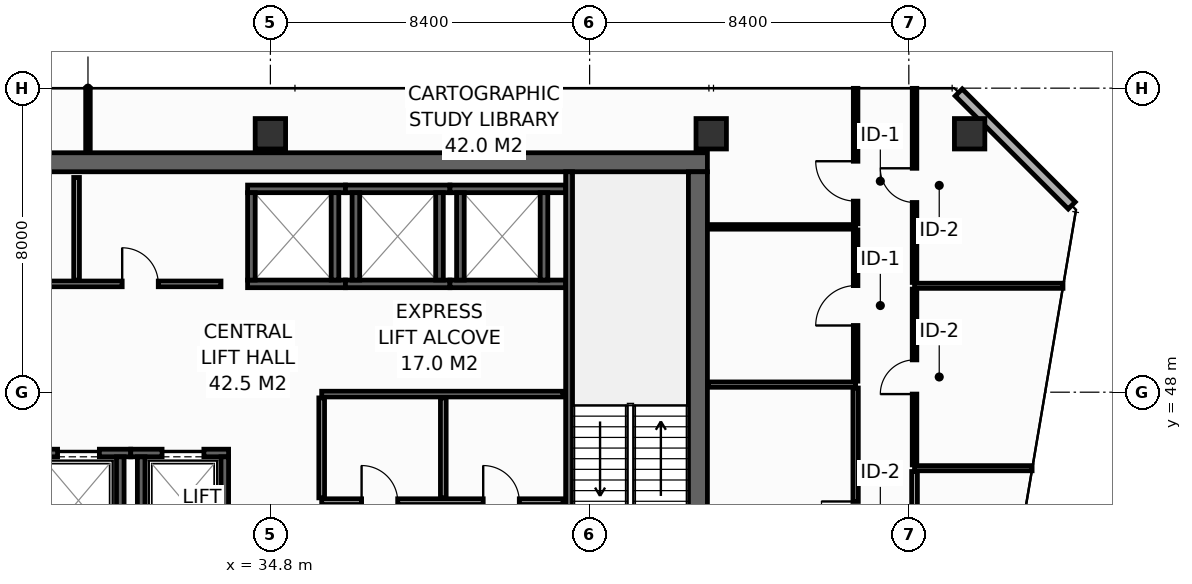
"""IFC4 building model, lengths in metres.
Left out: names, types, materials, properties, quantities, classifications, styles, units other than length and angle.
Written with IfcOpenShell. Run it as: python <this file> out.ifc"""

import sys

from ifc_helpers import new_model, si_unit, direction, frame, frame_2d, origin, origin_2d, place, context, subcontext, project, spatial, rectangle, hollow_rectangle, extrude, element, fill, save


model = new_model("IFC4")
c1 = context("Model", 3, precision=1e-05, world=origin(), true_north=direction((0.0, 1.0)))
c2 = subcontext(c1, "Body", "Model", "MODEL_VIEW")
j1 = project(units=[si_unit("LENGTHUNIT", "METRE"), si_unit("PLANEANGLEUNIT", "RADIAN")], contexts=[c1])
p1 = place(None, origin())
s1 = spatial("IfcSite", under=j1, at=p1, CompositionType="ELEMENT")
p2 = place(p1, origin())
s2 = spatial("IfcBuilding", under=s1, at=p2, CompositionType="ELEMENT")
p3 = place(p2, frame((0.0, 0.0, 194.2)))
s3 = spatial("IfcBuildingStorey", under=s2, at=p3, CompositionType="ELEMENT", Elevation=194.2)
p4 = place(p3, frame((13.6, 54.05, 0.0), z_axis=(0.0, 0.0, 1.0), x_axis=(1.0, 0.0, 0.0)))
e1 = element("IfcWall", 1, at=p4, inside=s3, PredefinedType="SHEAR", context=c2, shape_type="SweptSolid", body=[
    extrude(rectangle(XDim=32.7, YDim=0.5, at=frame_2d((16.35, 0.0))), origin(), (0.0, 0.0, 1.0), 3.55),
])
p5 = place(p3, frame((46.05, 43.4, 0.0), z_axis=(0.0, 0.0, 1.0), x_axis=(0.0, 1.0, 0.0)))
e2 = element("IfcWall", 2, at=p5, inside=s3, PredefinedType="SHEAR", context=c2, shape_type="SweptSolid", body=[
    extrude(rectangle(XDim=10.4, YDim=0.5, at=frame_2d((5.2, 0.0))), origin(), (0.0, 0.0, 1.0), 3.55),
])
for number, where, z_axis, x_axis in (
    (3, (34.8, 54.8, 0.0), (0.0, 0.0, 1.0), (1.0, 0.0, 0.0)),
    (4, (46.4, 54.8, 0.0), (0.0, 0.0, 1.0), (1.0, 0.0, 0.0)),
    (5, (53.2, 54.8, 0.0), (0.0, 0.0, 1.0), (1.0, 0.0, 0.0)),
):
    element("IfcColumn", number, at=place(p3, frame(where, z_axis=z_axis, x_axis=x_axis)), inside=s3, PredefinedType="COLUMN", context=c2, shape_type="SweptSolid", body=[
        extrude(hollow_rectangle(XDim=0.8, YDim=0.8, WallThickness=0.036, at=origin_2d()), origin(), (0.0, 0.0, 1.0), 3.8),
    ])
p6 = place(p3, frame((28.375, 46.4, 0.0), z_axis=(0.0, 0.0, 1.0), x_axis=(1.0, 0.0, 0.0)))
e6 = element("IfcWall", 6, at=p6, inside=s3, PredefinedType="SHEAR", context=c2, shape_type="SweptSolid", body=[
    extrude(rectangle(XDim=2.75, YDim=0.2, at=frame_2d((1.375, 0.0))), origin(), (0.0, 0.0, 1.0), 3.55),
])
p7 = place(p6, frame((0.825, 0.0, 0.0)))
e7 = element("IfcOpeningElement", 7, at=p7, cuts=e6, PredefinedType="OPENING", context=c2, shape_type="SweptSolid", body=[
    extrude(rectangle(XDim=1.1, YDim=2.2, at=frame_2d((0.55, 1.1))), frame((0.0, 0.11, 0.0), z_axis=(0.0, -1.0, 0.0), x_axis=(1.0, 0.0, 0.0)), (0.0, 0.0, 1.0), 0.22),
])
p8 = place(p3, frame((30.85, 44.0, 0.0), z_axis=(0.0, 0.0, 1.0), x_axis=(0.0, 1.0, 0.0)))
e8 = element("IfcWall", 8, at=p8, inside=s3, PredefinedType="SHEAR", context=c2, shape_type="SweptSolid", body=[
    extrude(rectangle(XDim=2.3, YDim=0.2, at=frame_2d((1.15, 0.0))), origin(), (0.0, 0.0, 1.0), 3.55),
])
p9 = place(p3, frame((31.125, 46.4, 0.0), z_axis=(0.0, 0.0, 1.0), x_axis=(1.0, 0.0, 0.0)))
e9 = element("IfcWall", 9, at=p9, inside=s3, PredefinedType="SHEAR", context=c2, shape_type="SweptSolid", body=[
    extrude(rectangle(XDim=2.575, YDim=0.2, at=frame_2d((1.288, 0.0))), origin(), (0.0, 0.0, 1.0), 3.55),
])
p10 = place(p9, frame((0.825, 0.0, 0.0)))
e10 = element("IfcOpeningElement", 10, at=p10, cuts=e9, PredefinedType="OPENING", context=c2, shape_type="SweptSolid", body=[
    extrude(rectangle(XDim=1.1, YDim=2.2, at=frame_2d((0.55, 1.1))), frame((0.0, 0.11, 0.0), z_axis=(0.0, -1.0, 0.0), x_axis=(1.0, 0.0, 0.0)), (0.0, 0.0, 1.0), 0.22),
])
for number, where, z_axis, x_axis in (
    (11, (31.4, 44.0, 0.0), (0.0, 0.0, 1.0), (0.0, 1.0, 0.0)),
    (12, (33.6, 44.0, 0.0), (0.0, 0.0, 1.0), (0.0, 1.0, 0.0)),
):
    element("IfcWall", number, at=place(p3, frame(where, z_axis=z_axis, x_axis=x_axis)), inside=s3, PredefinedType="SHEAR", context=c2, shape_type="SweptSolid", body=[
        extrude(rectangle(XDim=2.3, YDim=0.2, at=frame_2d((1.15, 0.0))), origin(), (0.0, 0.0, 1.0), 3.55),
    ])
for number, where, z_axis, x_axis in (
    (13, (34.2, 50.85, 0.0), (0.0, 0.0, 1.0), (1.0, 0.0, 0.0)),
    (14, (34.2, 53.35, 0.0), (0.0, 0.0, 1.0), (1.0, 0.0, 0.0)),
):
    element("IfcWall", number, at=place(p3, frame(where, z_axis=z_axis, x_axis=x_axis)), inside=s3, PredefinedType="SHEAR", context=c2, shape_type="SweptSolid", body=[
        extrude(rectangle(XDim=2.575, YDim=0.2, at=frame_2d((1.288, 0.0))), origin(), (0.0, 0.0, 1.0), 3.55),
    ])
for number, where, z_axis, x_axis in (
    (15, (34.3, 50.95, 0.0), (0.0, 0.0, 1.0), (0.0, 1.0, 0.0)),
    (16, (36.5, 50.95, 0.0), (0.0, 0.0, 1.0), (0.0, 1.0, 0.0)),
):
    element("IfcWall", number, at=place(p3, frame(where, z_axis=z_axis, x_axis=x_axis)), inside=s3, PredefinedType="SHEAR", context=c2, shape_type="SweptSolid", body=[
        extrude(rectangle(XDim=2.3, YDim=0.2, at=frame_2d((1.15, 0.0))), origin(), (0.0, 0.0, 1.0), 3.55),
    ])
for number, where, z_axis, x_axis in (
    (17, (36.775, 50.85, 0.0), (0.0, 0.0, 1.0), (1.0, 0.0, 0.0)),
    (18, (36.775, 53.35, 0.0), (0.0, 0.0, 1.0), (1.0, 0.0, 0.0)),
):
    element("IfcWall", number, at=place(p3, frame(where, z_axis=z_axis, x_axis=x_axis)), inside=s3, PredefinedType="SHEAR", context=c2, shape_type="SweptSolid", body=[
        extrude(rectangle(XDim=2.75, YDim=0.2, at=frame_2d((1.375, 0.0))), origin(), (0.0, 0.0, 1.0), 3.55),
    ])
for number, where, z_axis, x_axis in (
    (19, (37.05, 50.95, 0.0), (0.0, 0.0, 1.0), (0.0, 1.0, 0.0)),
    (20, (39.25, 50.95, 0.0), (0.0, 0.0, 1.0), (0.0, 1.0, 0.0)),
):
    element("IfcWall", number, at=place(p3, frame(where, z_axis=z_axis, x_axis=x_axis)), inside=s3, PredefinedType="SHEAR", context=c2, shape_type="SweptSolid", body=[
        extrude(rectangle(XDim=2.3, YDim=0.2, at=frame_2d((1.15, 0.0))), origin(), (0.0, 0.0, 1.0), 3.55),
    ])
for number, where, z_axis, x_axis in (
    (21, (39.525, 50.85, 0.0), (0.0, 0.0, 1.0), (1.0, 0.0, 0.0)),
    (22, (39.525, 53.35, 0.0), (0.0, 0.0, 1.0), (1.0, 0.0, 0.0)),
):
    element("IfcWall", number, at=place(p3, frame(where, z_axis=z_axis, x_axis=x_axis)), inside=s3, PredefinedType="SHEAR", context=c2, shape_type="SweptSolid", body=[
        extrude(rectangle(XDim=3.045, YDim=0.2, at=frame_2d((1.522, 0.0))), origin(), (0.0, 0.0, 1.0), 3.55),
    ])
for number, where, z_axis, x_axis in (
    (23, (39.8, 50.95, 0.0), (0.0, 0.0, 1.0), (0.0, 1.0, 0.0)),
    (24, (42.0, 50.95, 0.0), (0.0, 0.0, 1.0), (0.0, 1.0, 0.0)),
):
    element("IfcWall", number, at=place(p3, frame(where, z_axis=z_axis, x_axis=x_axis)), inside=s3, PredefinedType="SHEAR", context=c2, shape_type="SweptSolid", body=[
        extrude(rectangle(XDim=2.3, YDim=0.2, at=frame_2d((1.15, 0.0))), origin(), (0.0, 0.0, 1.0), 3.55),
    ])
p11 = place(p3, frame((42.66, 53.8, 0.0), z_axis=(0.0, 0.0, 1.0), x_axis=(0.0, -1.0, 0.0)))
e25 = element("IfcWall", 25, at=p11, inside=s3, PredefinedType="SHEAR", context=c2, shape_type="SweptSolid", body=[
    extrude(rectangle(XDim=10.4, YDim=0.18, at=frame_2d((5.2, 0.0))), origin(), (0.0, 0.0, 1.0), 3.55),
])
p12 = place(p11, frame((8.99, 0.0, 0.0)))
e26 = element("IfcOpeningElement", 26, at=p12, cuts=e25, PredefinedType="OPENING", context=c2, shape_type="SweptSolid", body=[
    extrude(rectangle(XDim=1.1, YDim=2.15, at=frame_2d((0.55, 1.075))), frame((0.0, 0.1, 0.0), z_axis=(0.0, -1.0, 0.0), x_axis=(1.0, 0.0, 0.0)), (0.0, 0.0, 1.0), 0.2),
])
p13 = place(p3, frame((36.15, 45.12, 0.0), z_axis=(0.0, 0.0, 1.0), x_axis=(1.0, 0.0, 0.0)))
e27 = element("IfcWall", 27, at=p13, inside=s3, PredefinedType="PARTITIONING", context=c2, shape_type="SweptSolid", body=[
    extrude(rectangle(XDim=6.35, YDim=0.15, at=frame_2d((3.175, 0.0))), origin(), (0.0, 0.0, 1.0), 3.55),
])
p14 = place(p13, frame((1.05, 0.0, 0.0)))
e28 = element("IfcOpeningElement", 28, at=p14, cuts=e27, PredefinedType="OPENING", context=c2, shape_type="SweptSolid", body=[
    extrude(rectangle(XDim=0.95, YDim=2.15, at=frame_2d((0.475, 1.075))), frame((0.0, 0.085, 0.0), z_axis=(0.0, -1.0, 0.0), x_axis=(1.0, 0.0, 0.0)), (0.0, 0.0, 1.0), 0.17),
])
p15 = place(p13, frame((4.25, 0.0, 0.0)))
e29 = element("IfcOpeningElement", 29, at=p15, cuts=e27, PredefinedType="OPENING", context=c2, shape_type="SweptSolid", body=[
    extrude(rectangle(XDim=0.95, YDim=2.15, at=frame_2d((0.475, 1.075))), frame((0.0, 0.085, 0.0), z_axis=(0.0, -1.0, 0.0), x_axis=(1.0, 0.0, 0.0)), (0.0, 0.0, 1.0), 0.17),
])
p16 = place(p3, frame((36.15, 47.95, 0.0), z_axis=(0.0, 0.0, 1.0), x_axis=(1.0, 0.0, 0.0)))
e30 = element("IfcWall", 30, at=p16, inside=s3, PredefinedType="PARTITIONING", context=c2, shape_type="SweptSolid", body=[
    extrude(rectangle(XDim=6.35, YDim=0.15, at=frame_2d((3.175, 0.0))), origin(), (0.0, 0.0, 1.0), 3.55),
])
for number, where, z_axis, x_axis in (
    (31, (36.15, 45.22, 0.0), (0.0, 0.0, 1.0), (0.0, 1.0, 0.0)),
    (32, (39.35, 45.22, 0.0), (0.0, 0.0, 1.0), (0.0, 1.0, 0.0)),
):
    element("IfcWall", number, at=place(p3, frame(where, z_axis=z_axis, x_axis=x_axis)), inside=s3, PredefinedType="PARTITIONING", context=c2, shape_type="SweptSolid", body=[
        extrude(rectangle(XDim=2.63, YDim=0.15, at=frame_2d((1.315, 0.0))), origin(), (0.0, 0.0, 1.0), 3.55),
    ])
p17 = place(p3, frame((25.85, 50.85, 0.0), z_axis=(0.0, 0.0, 1.0), x_axis=(1.0, 0.0, 0.0)))
e33 = element("IfcWall", 33, at=p17, inside=s3, PredefinedType="PARTITIONING", context=c2, shape_type="SweptSolid", body=[
    extrude(rectangle(XDim=7.65, YDim=0.15, at=frame_2d((3.825, 0.0))), origin(), (0.0, 0.0, 1.0), 3.55),
])
p18 = place(p17, frame((1.25, 0.0, 0.0)))
e34 = element("IfcOpeningElement", 34, at=p18, cuts=e33, PredefinedType="OPENING", context=c2, shape_type="SweptSolid", body=[
    extrude(rectangle(XDim=0.95, YDim=2.15, at=frame_2d((0.475, 1.075))), frame((0.0, 0.085, 0.0), z_axis=(0.0, -1.0, 0.0), x_axis=(1.0, 0.0, 0.0)), (0.0, 0.0, 1.0), 0.17),
])
p19 = place(p17, frame((5.05, 0.0, 0.0)))
e35 = element("IfcOpeningElement", 35, at=p19, cuts=e33, PredefinedType="OPENING", context=c2, shape_type="SweptSolid", body=[
    extrude(rectangle(XDim=0.95, YDim=2.15, at=frame_2d((0.475, 1.075))), frame((0.0, 0.085, 0.0), z_axis=(0.0, -1.0, 0.0), x_axis=(1.0, 0.0, 0.0)), (0.0, 0.0, 1.0), 0.17),
])
p20 = place(p3, frame((29.7, 50.95, 0.0), z_axis=(0.0, 0.0, 1.0), x_axis=(0.0, 1.0, 0.0)))
e36 = element("IfcWall", 36, at=p20, inside=s3, PredefinedType="PARTITIONING", context=c2, shape_type="SweptSolid", body=[
    extrude(rectangle(XDim=2.7, YDim=0.15, at=frame_2d((1.35, 0.0))), origin(), (0.0, 0.0, 1.0), 3.55),
])
p21 = place(p3, frame((55.887, 52.913, 0.0), z_axis=(0.0, 0.0, 1.0), x_axis=(-0.707106781187, 0.707106781187, 0.0)))
e37 = element("IfcWall", 37, at=p21, inside=s3, PredefinedType="STANDARD", context=c2, shape_type="SweptSolid", body=[
    extrude(rectangle(XDim=4.206, YDim=0.26, at=frame_2d((2.103, 0.0))), origin(), (0.0, 0.0, 1.0), 3.55),
])
p22 = place(p3, frame((46.32, 48.2, 0.0), z_axis=(0.0, 0.0, 1.0), x_axis=(1.0, 0.0, 0.0)))
e38 = element("IfcWall", 38, at=p22, inside=s3, PredefinedType="PARTITIONING", context=c2, shape_type="SweptSolid", body=[
    extrude(rectangle(XDim=3.88, YDim=0.14, at=frame_2d((1.94, 0.0))), origin(), (0.0, 0.0, 1.0), 3.55),
])
p23 = place(p3, frame((50.2, 41.24, 0.0), z_axis=(0.0, 0.0, 1.0), x_axis=(0.0, 1.0, 0.0)))
e39 = element("IfcWall", 39, at=p23, inside=s3, PredefinedType="PARTITIONING", context=c2, shape_type="SweptSolid", body=[
    extrude(rectangle(XDim=6.87, YDim=0.14, at=frame_2d((3.435, 0.0))), origin(), (0.0, 0.0, 1.0), 2.835),
])
p24 = place(p23, frame((2.985, 0.0, 0.0)))
e40 = element("IfcOpeningElement", 40, at=p24, cuts=e39, PredefinedType="OPENING", context=c2, shape_type="SweptSolid", body=[
    extrude(rectangle(XDim=0.9, YDim=2.1, at=frame_2d((0.45, 1.05))), frame((0.0, 0.08, 0.0), z_axis=(0.0, -1.0, 0.0), x_axis=(1.0, 0.0, 0.0)), (0.0, 0.0, 1.0), 0.16),
])
p25 = place(p3, frame((46.32, 52.35, 0.0), z_axis=(0.0, 0.0, 1.0), x_axis=(1.0, 0.0, 0.0)))
e41 = element("IfcWall", 41, at=p25, inside=s3, PredefinedType="PARTITIONING", context=c2, shape_type="SweptSolid", body=[
    extrude(rectangle(XDim=3.88, YDim=0.12, at=frame_2d((1.94, 0.0))), origin(), (0.0, 0.0, 1.0), 3.55),
])
p26 = place(p3, frame((30.0, 54.32, 0.0), z_axis=(0.0, 0.0, 1.0), x_axis=(0.0, 1.0, 0.0)))
e42 = element("IfcWall", 42, at=p26, inside=s3, PredefinedType="PARTITIONING", context=c2, shape_type="SweptSolid", body=[
    extrude(rectangle(XDim=1.675, YDim=0.12, at=frame_2d((0.837, 0.0))), origin(), (0.0, 0.0, 1.0), 2.935),
])
p27 = place(p3, frame((50.2, 48.29, 0.0), z_axis=(0.0, 0.0, 1.0), x_axis=(0.0, 1.0, 0.0)))
e43 = element("IfcWall", 43, at=p27, inside=s3, PredefinedType="PARTITIONING", context=c2, shape_type="SweptSolid", body=[
    extrude(rectangle(XDim=3.98, YDim=0.12, at=frame_2d((1.99, 0.0))), origin(), (0.0, 0.0, 1.0), 3.55),
])
p28 = place(p27, frame((1.465, 0.0, 0.0)))
e44 = element("IfcOpeningElement", 44, at=p28, cuts=e43, PredefinedType="OPENING", context=c2, shape_type="SweptSolid", body=[
    extrude(rectangle(XDim=1.05, YDim=2.15, at=frame_2d((0.525, 1.075))), frame((0.0, 0.07, 0.0), z_axis=(0.0, -1.0, 0.0), x_axis=(1.0, 0.0, 0.0)), (0.0, 0.0, 1.0), 0.14),
])
p29 = place(p3, frame((50.2, 52.43, 0.0), z_axis=(0.0, 0.0, 1.0), x_axis=(0.0, 1.0, 0.0)))
e45 = element("IfcWall", 45, at=p29, inside=s3, PredefinedType="PARTITIONING", context=c2, shape_type="SweptSolid", body=[
    extrude(rectangle(XDim=3.565, YDim=0.12, at=frame_2d((1.783, 0.0))), origin(), (0.0, 0.0, 1.0), 2.935),
])
p30 = place(p29, frame((0.597, 0.0, 0.0)))
e46 = element("IfcOpeningElement", 46, at=p30, cuts=e45, PredefinedType="OPENING", context=c2, shape_type="SweptSolid", body=[
    extrude(rectangle(XDim=1.05, YDim=2.15, at=frame_2d((0.525, 1.075))), frame((0.0, 0.07, 0.0), z_axis=(0.0, -1.0, 0.0), x_axis=(1.0, 0.0, 0.0)), (0.0, 0.0, 1.0), 0.14),
])
p31 = place(p3, frame((51.75, 46.0, 0.0), z_axis=(0.0, 0.0, 1.0), x_axis=(1.0, 0.0, 0.0)))
e47 = element("IfcWall", 47, at=p31, inside=s3, PredefinedType="PARTITIONING", context=c2, shape_type="SweptSolid", body=[
    extrude(rectangle(XDim=3.094, YDim=0.135, at=frame_2d((1.547, 0.0))), origin(), (0.0, 0.0, 1.0), 2.835),
])
p32 = place(p3, frame((51.75, 50.8, 0.0), z_axis=(0.0, 0.0, 1.0), x_axis=(1.0, 0.0, 0.0)))
e48 = element("IfcWall", 48, at=p32, inside=s3, PredefinedType="PARTITIONING", context=c2, shape_type="SweptSolid", body=[
    extrude(rectangle(XDim=3.906, YDim=0.135, at=frame_2d((1.953, 0.0))), origin(), (0.0, 0.0, 1.0), 2.835),
])
p33 = place(p3, frame((51.75, 41.238, 0.0), z_axis=(0.0, 0.0, 1.0), x_axis=(0.0, 1.0, 0.0)))
e49 = element("IfcWall", 49, at=p33, inside=s3, PredefinedType="PARTITIONING", context=c2, shape_type="SweptSolid", body=[
    extrude(rectangle(XDim=4.675, YDim=0.15, at=frame_2d((2.337, 0.0))), origin(), (0.0, 0.0, 1.0), 2.835),
])
p34 = place(p33, frame((1.813, 0.0, 0.0)))
e50 = element("IfcOpeningElement", 50, at=p34, cuts=e49, PredefinedType="OPENING", context=c2, shape_type="SweptSolid", body=[
    extrude(rectangle(XDim=1.05, YDim=2.15, at=frame_2d((0.525, 1.075))), frame((0.0, 0.085, 0.0), z_axis=(0.0, -1.0, 0.0), x_axis=(1.0, 0.0, 0.0)), (0.0, 0.0, 1.0), 0.17),
])
p35 = place(p3, frame((51.75, 46.087, 0.0), z_axis=(0.0, 0.0, 1.0), x_axis=(0.0, 1.0, 0.0)))
e51 = element("IfcWall", 51, at=p35, inside=s3, PredefinedType="PARTITIONING", context=c2, shape_type="SweptSolid", body=[
    extrude(rectangle(XDim=4.625, YDim=0.12, at=frame_2d((2.312, 0.0))), origin(), (0.0, 0.0, 1.0), 3.55),
])
p36 = place(p35, frame((1.863, 0.0, 0.0)))
e52 = element("IfcOpeningElement", 52, at=p36, cuts=e51, PredefinedType="OPENING", context=c2, shape_type="SweptSolid", body=[
    extrude(rectangle(XDim=0.9, YDim=2.1, at=frame_2d((0.45, 1.05))), frame((0.0, 0.07, 0.0), z_axis=(0.0, -1.0, 0.0), x_axis=(1.0, 0.0, 0.0)), (0.0, 0.0, 1.0), 0.14),
])
p37 = place(p3, frame((51.75, 50.887, 0.0), z_axis=(0.0, 0.0, 1.0), x_axis=(0.0, 1.0, 0.0)))
e53 = element("IfcWall", 53, at=p37, inside=s3, PredefinedType="PARTITIONING", context=c2, shape_type="SweptSolid", body=[
    extrude(rectangle(XDim=5.108, YDim=0.12, at=frame_2d((2.554, 0.0))), origin(), (0.0, 0.0, 1.0), 2.935),
])
p38 = place(p37, frame((2.104, 0.0, 0.0)))
e54 = element("IfcOpeningElement", 54, at=p38, cuts=e53, PredefinedType="OPENING", context=c2, shape_type="SweptSolid", body=[
    extrude(rectangle(XDim=0.9, YDim=2.1, at=frame_2d((0.45, 1.05))), frame((0.0, 0.07, 0.0), z_axis=(0.0, -1.0, 0.0), x_axis=(1.0, 0.0, 0.0)), (0.0, 0.0, 1.0), 0.14),
])
p39 = place(p7, origin())
e55 = element("IfcDoor", 55, at=p39, inside=s3, OperationType="SLIDING_TO_LEFT", PredefinedType="DOOR", context=c2, shape_type="SweptSolid", body=[
    extrude(rectangle(XDim=1.1, YDim=2.2, at=frame_2d((0.55, 1.1))), frame((0.0, 0.025, 0.0), z_axis=(0.0, -1.0, 0.0), x_axis=(1.0, 0.0, 0.0)), (0.0, 0.0, 1.0), 0.05),
])
fill(e7, e55)
p40 = place(p10, origin())
e56 = element("IfcDoor", 56, at=p40, inside=s3, OperationType="SLIDING_TO_LEFT", PredefinedType="DOOR", context=c2, shape_type="SweptSolid", body=[
    extrude(rectangle(XDim=1.1, YDim=2.2, at=frame_2d((0.55, 1.1))), frame((0.0, 0.025, 0.0), z_axis=(0.0, -1.0, 0.0), x_axis=(1.0, 0.0, 0.0)), (0.0, 0.0, 1.0), 0.05),
])
fill(e10, e56)
p41 = place(p14, origin())
e57 = element("IfcDoor", 57, at=p41, inside=s3, OperationType="SINGLE_SWING_LEFT", PredefinedType="DOOR", context=c2, shape_type="SweptSolid", body=[
    extrude(rectangle(XDim=0.95, YDim=2.15, at=frame_2d((0.475, 1.075))), frame((0.0, 0.025, 0.0), z_axis=(0.0, -1.0, 0.0), x_axis=(1.0, 0.0, 0.0)), (0.0, 0.0, 1.0), 0.05),
])
fill(e28, e57)
p42 = place(p15, origin())
e58 = element("IfcDoor", 58, at=p42, inside=s3, OperationType="SINGLE_SWING_LEFT", PredefinedType="DOOR", context=c2, shape_type="SweptSolid", body=[
    extrude(rectangle(XDim=0.95, YDim=2.15, at=frame_2d((0.475, 1.075))), frame((0.0, 0.025, 0.0), z_axis=(0.0, -1.0, 0.0), x_axis=(1.0, 0.0, 0.0)), (0.0, 0.0, 1.0), 0.05),
])
fill(e29, e58)
p43 = place(p19, origin())
e59 = element("IfcDoor", 59, at=p43, inside=s3, OperationType="SINGLE_SWING_LEFT", PredefinedType="DOOR", context=c2, shape_type="SweptSolid", body=[
    extrude(rectangle(XDim=0.95, YDim=2.15, at=frame_2d((0.475, 1.075))), frame((0.0, 0.025, 0.0), z_axis=(0.0, -1.0, 0.0), x_axis=(1.0, 0.0, 0.0)), (0.0, 0.0, 1.0), 0.05),
])
fill(e35, e59)
p44 = place(p24, origin())
e60 = element("IfcDoor", 60, at=p44, inside=s3, OperationType="SINGLE_SWING_RIGHT", PredefinedType="DOOR", context=c2, shape_type="SweptSolid", body=[
    extrude(rectangle(XDim=0.9, YDim=2.1, at=frame_2d((0.45, 1.05))), frame((0.0, 0.025, 0.0), z_axis=(0.0, -1.0, 0.0), x_axis=(1.0, 0.0, 0.0)), (0.0, 0.0, 1.0), 0.05),
])
fill(e40, e60)
p45 = place(p28, origin())
e61 = element("IfcDoor", 61, at=p45, inside=s3, OperationType="SINGLE_SWING_LEFT", PredefinedType="DOOR", context=c2, shape_type="SweptSolid", body=[
    extrude(rectangle(XDim=1.05, YDim=2.15, at=frame_2d((0.525, 1.075))), frame((0.0, 0.025, 0.0), z_axis=(0.0, -1.0, 0.0), x_axis=(1.0, 0.0, 0.0)), (0.0, 0.0, 1.0), 0.05),
])
fill(e44, e61)
p46 = place(p30, origin())
e62 = element("IfcDoor", 62, at=p46, inside=s3, OperationType="SINGLE_SWING_RIGHT", PredefinedType="DOOR", context=c2, shape_type="SweptSolid", body=[
    extrude(rectangle(XDim=1.05, YDim=2.15, at=frame_2d((0.525, 1.075))), frame((0.0, 0.025, 0.0), z_axis=(0.0, -1.0, 0.0), x_axis=(1.0, 0.0, 0.0)), (0.0, 0.0, 1.0), 0.05),
])
fill(e46, e62)
p47 = place(p36, origin())
e63 = element("IfcDoor", 63, at=p47, inside=s3, OperationType="SINGLE_SWING_LEFT", PredefinedType="DOOR", context=c2, shape_type="SweptSolid", body=[
    extrude(rectangle(XDim=0.9, YDim=2.1, at=frame_2d((0.45, 1.05))), frame((0.0, 0.025, 0.0), z_axis=(0.0, -1.0, 0.0), x_axis=(1.0, 0.0, 0.0)), (0.0, 0.0, 1.0), 0.05),
])
fill(e52, e63)
p48 = place(p38, origin())
e64 = element("IfcDoor", 64, at=p48, inside=s3, OperationType="SINGLE_SWING_RIGHT", PredefinedType="DOOR", context=c2, shape_type="SweptSolid", body=[
    extrude(rectangle(XDim=0.9, YDim=2.1, at=frame_2d((0.45, 1.05))), frame((0.0, 0.025, 0.0), z_axis=(0.0, -1.0, 0.0), x_axis=(1.0, 0.0, 0.0)), (0.0, 0.0, 1.0), 0.05),
])
fill(e54, e64)
save(model, sys.argv[1])
